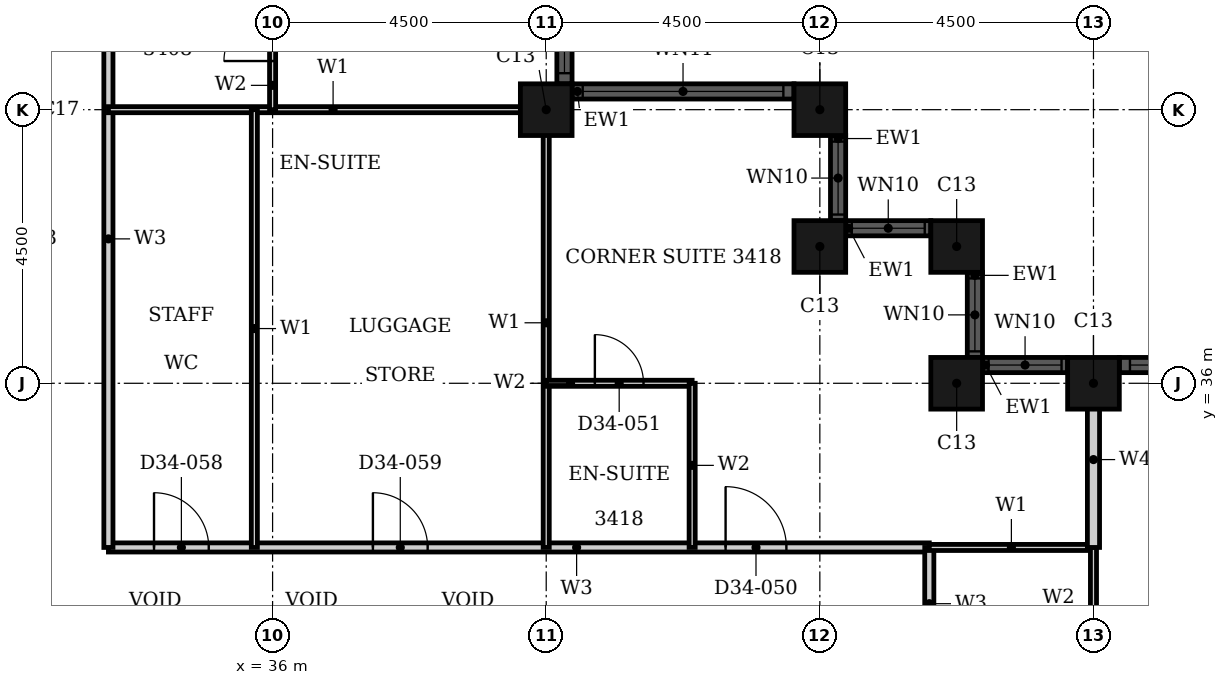
"""IFC4 building model, lengths in metres.
Left out: names, types, materials, properties, quantities, classifications, styles, units other than length and angle.
Written with IfcOpenShell. Run it as: python <this file> out.ifc"""

import sys

from ifc_helpers import new_model, si_unit, direction, frame, frame_2d, origin, origin_2d, place, context, subcontext, project, spatial, rectangle, hollow_rectangle, extrude, element, fill, save


model = new_model("IFC4")
c1 = context("Model", 3, precision=1e-05, world=origin(), true_north=direction((0.0, 1.0)))
c2 = subcontext(c1, "Body", "Model", "MODEL_VIEW")
j1 = project(units=[si_unit("LENGTHUNIT", "METRE"), si_unit("PLANEANGLEUNIT", "RADIAN")], contexts=[c1])
p1 = place(None, origin())
s1 = spatial("IfcSite", under=j1, at=p1, CompositionType="ELEMENT")
p2 = place(p1, origin())
s2 = spatial("IfcBuilding", under=s1, at=p2, CompositionType="ELEMENT")
p3 = place(p2, frame((0.0, 0.0, 136.8)))
s3 = spatial("IfcBuildingStorey", under=s2, at=p3, CompositionType="ELEMENT", Elevation=136.8)
for number, where, z_axis, x_axis in (
    (1, (49.5, 36.0, 0.0), (0.0, 0.0, 1.0), (1.0, 0.0, 0.0)),
    (2, (47.25, 36.0, 0.0), (0.0, 0.0, 1.0), (1.0, 0.0, 0.0)),
    (3, (47.25, 38.25, 0.0), (0.0, 0.0, 1.0), (1.0, 0.0, 0.0)),
    (4, (45.0, 38.25, 0.0), (0.0, 0.0, 1.0), (1.0, 0.0, 0.0)),
    (5, (45.0, 40.5, 0.0), (0.0, 0.0, 1.0), (1.0, 0.0, 0.0)),
):
    element("IfcColumn", number, at=place(p3, frame(where, z_axis=z_axis, x_axis=x_axis)), inside=s3, PredefinedType="COLUMN", context=c2, shape_type="SweptSolid", body=[
        extrude(hollow_rectangle(XDim=0.85, YDim=0.85, WallThickness=0.026, at=origin_2d()), origin(), (0.0, 0.0, 1.0), 3.6),
    ])
p4 = place(p3, frame((40.5, 40.5, 0.0), z_axis=(0.0, 0.0, 1.0), x_axis=(1.0, 0.0, 0.0)))
e6 = element("IfcColumn", 6, at=p4, inside=s3, PredefinedType="COLUMN", context=c2, shape_type="SweptSolid", body=[
    extrude(hollow_rectangle(XDim=0.85, YDim=0.85, WallThickness=0.026, at=origin_2d()), origin(), (0.0, 0.0, 1.0), 3.2),
])
p5 = place(p3, frame((58.075, 36.3, 0.0), z_axis=(0.0, 0.0, 1.0), x_axis=(-1.0, 0.0, 0.0)))
e7 = element("IfcWall", 7, at=p5, inside=s3, PredefinedType="SOLIDWALL", context=c2, shape_type="SweptSolid", body=[
    extrude(rectangle(XDim=8.15, YDim=0.25, at=frame_2d((4.075, 0.0))), origin(), (0.0, 0.0, 1.0), 3.6),
])
p6 = place(p5, frame((0.175, 0.0, 0.9)))
e8 = element("IfcOpeningElement", 8, at=p6, cuts=e7, PredefinedType="OPENING", context=c2, shape_type="SweptSolid", body=[
    extrude(rectangle(XDim=3.3, YDim=1.85, at=frame_2d((1.65, 0.925))), frame((0.0, 0.135, 0.0), z_axis=(0.0, -1.0, 0.0), x_axis=(1.0, 0.0, 0.0)), (0.0, 0.0, 1.0), 0.27),
])
p7 = place(p5, frame((4.675, 0.0, 0.9)))
e9 = element("IfcOpeningElement", 9, at=p7, cuts=e7, PredefinedType="OPENING", context=c2, shape_type="SweptSolid", body=[
    extrude(rectangle(XDim=3.3, YDim=1.85, at=frame_2d((1.65, 0.925))), frame((0.0, 0.135, 0.0), z_axis=(0.0, -1.0, 0.0), x_axis=(1.0, 0.0, 0.0)), (0.0, 0.0, 1.0), 0.27),
])
p8 = place(p3, frame((49.075, 36.3, 0.0), z_axis=(0.0, 0.0, 1.0), x_axis=(-1.0, 0.0, 0.0)))
e10 = element("IfcWall", 10, at=p8, inside=s3, PredefinedType="SOLIDWALL", context=c2, shape_type="SweptSolid", body=[
    extrude(rectangle(XDim=1.4, YDim=0.25, at=frame_2d((0.7, 0.0))), origin(), (0.0, 0.0, 1.0), 3.6),
])
p9 = place(p8, frame((0.1, 0.0, 0.9)))
e11 = element("IfcOpeningElement", 11, at=p9, cuts=e10, PredefinedType="OPENING", context=c2, shape_type="SweptSolid", body=[
    extrude(rectangle(XDim=1.2, YDim=1.85, at=frame_2d((0.6, 0.925))), frame((0.0, 0.135, 0.0), z_axis=(0.0, -1.0, 0.0), x_axis=(1.0, 0.0, 0.0)), (0.0, 0.0, 1.0), 0.27),
])
p10 = place(p3, frame((47.55, 36.425, 0.0), z_axis=(0.0, 0.0, 1.0), x_axis=(0.0, 1.0, 0.0)))
e12 = element("IfcWall", 12, at=p10, inside=s3, PredefinedType="SOLIDWALL", context=c2, shape_type="SweptSolid", body=[
    extrude(rectangle(XDim=1.4, YDim=0.25, at=frame_2d((0.7, 0.0))), origin(), (0.0, 0.0, 1.0), 3.6),
])
p11 = place(p10, frame((0.1, 0.0, 0.9)))
e13 = element("IfcOpeningElement", 13, at=p11, cuts=e12, PredefinedType="OPENING", context=c2, shape_type="SweptSolid", body=[
    extrude(rectangle(XDim=1.2, YDim=1.85, at=frame_2d((0.6, 0.925))), frame((0.0, 0.135, 0.0), z_axis=(0.0, -1.0, 0.0), x_axis=(1.0, 0.0, 0.0)), (0.0, 0.0, 1.0), 0.27),
])
p12 = place(p3, frame((46.825, 38.55, 0.0), z_axis=(0.0, 0.0, 1.0), x_axis=(-1.0, 0.0, 0.0)))
e14 = element("IfcWall", 14, at=p12, inside=s3, PredefinedType="SOLIDWALL", context=c2, shape_type="SweptSolid", body=[
    extrude(rectangle(XDim=1.4, YDim=0.25, at=frame_2d((0.7, 0.0))), origin(), (0.0, 0.0, 1.0), 3.6),
])
p13 = place(p12, frame((0.1, 0.0, 0.9)))
e15 = element("IfcOpeningElement", 15, at=p13, cuts=e14, PredefinedType="OPENING", context=c2, shape_type="SweptSolid", body=[
    extrude(rectangle(XDim=1.2, YDim=1.85, at=frame_2d((0.6, 0.925))), frame((0.0, 0.135, 0.0), z_axis=(0.0, -1.0, 0.0), x_axis=(1.0, 0.0, 0.0)), (0.0, 0.0, 1.0), 0.27),
])
p14 = place(p3, frame((45.3, 38.675, 0.0), z_axis=(0.0, 0.0, 1.0), x_axis=(0.0, 1.0, 0.0)))
e16 = element("IfcWall", 16, at=p14, inside=s3, PredefinedType="SOLIDWALL", context=c2, shape_type="SweptSolid", body=[
    extrude(rectangle(XDim=1.4, YDim=0.25, at=frame_2d((0.7, 0.0))), origin(), (0.0, 0.0, 1.0), 3.6),
])
p15 = place(p14, frame((0.1, 0.0, 0.9)))
e17 = element("IfcOpeningElement", 17, at=p15, cuts=e16, PredefinedType="OPENING", context=c2, shape_type="SweptSolid", body=[
    extrude(rectangle(XDim=1.2, YDim=1.85, at=frame_2d((0.6, 0.925))), frame((0.0, 0.135, 0.0), z_axis=(0.0, -1.0, 0.0), x_axis=(1.0, 0.0, 0.0)), (0.0, 0.0, 1.0), 0.27),
])
p16 = place(p3, frame((44.575, 40.8, 0.0), z_axis=(0.0, 0.0, 1.0), x_axis=(-1.0, 0.0, 0.0)))
e18 = element("IfcWall", 18, at=p16, inside=s3, PredefinedType="SOLIDWALL", context=c2, shape_type="SweptSolid", body=[
    extrude(rectangle(XDim=3.65, YDim=0.25, at=frame_2d((1.825, 0.0))), origin(), (0.0, 0.0, 1.0), 3.6),
])
p17 = place(p16, frame((0.175, 0.0, 0.9)))
e19 = element("IfcOpeningElement", 19, at=p17, cuts=e18, PredefinedType="OPENING", context=c2, shape_type="SweptSolid", body=[
    extrude(rectangle(XDim=3.3, YDim=1.35, at=frame_2d((1.65, 0.675))), frame((0.0, 0.135, 0.0), z_axis=(0.0, -1.0, 0.0), x_axis=(1.0, 0.0, 0.0)), (0.0, 0.0, 1.0), 0.27),
])
p18 = place(p3, frame((40.8, 40.925, 0.0), z_axis=(0.0, 0.0, 1.0), x_axis=(0.0, 1.0, 0.0)))
e20 = element("IfcWall", 20, at=p18, inside=s3, PredefinedType="SOLIDWALL", context=c2, shape_type="SweptSolid", body=[
    extrude(rectangle(XDim=8.15, YDim=0.25, at=frame_2d((4.075, 0.0))), origin(), (0.0, 0.0, 1.0), 3.6),
])
p19 = place(p18, frame((0.175, 0.0, 0.9)))
e21 = element("IfcOpeningElement", 21, at=p19, cuts=e20, PredefinedType="OPENING", context=c2, shape_type="SweptSolid", body=[
    extrude(rectangle(XDim=3.3, YDim=2.08, at=frame_2d((1.65, 1.04))), frame((0.0, 0.135, 0.0), z_axis=(0.0, -1.0, 0.0), x_axis=(1.0, 0.0, 0.0)), (0.0, 0.0, 1.0), 0.27),
])
p20 = place(p18, frame((4.675, 0.0, 0.9)))
e22 = element("IfcOpeningElement", 22, at=p20, cuts=e20, PredefinedType="OPENING", context=c2, shape_type="SweptSolid", body=[
    extrude(rectangle(XDim=3.3, YDim=2.08, at=frame_2d((1.65, 1.04))), frame((0.0, 0.135, 0.0), z_axis=(0.0, -1.0, 0.0), x_axis=(1.0, 0.0, 0.0)), (0.0, 0.0, 1.0), 0.27),
])
p21 = place(p3, frame((33.3, 33.3, 0.0), z_axis=(0.0, 0.0, 1.0), x_axis=(1.0, 0.0, 0.0)))
e23 = element("IfcWall", 23, at=p21, inside=s3, PredefinedType="PARTITIONING", context=c2, shape_type="SweptSolid", body=[
    extrude(rectangle(XDim=13.5, YDim=0.15, at=frame_2d((6.75, 0.0))), origin(), (0.0, 0.0, 1.0), 3.2),
])
p22 = place(p21, frame((10.15, 0.0, 0.0)))
e24 = element("IfcOpeningElement", 24, at=p22, cuts=e23, PredefinedType="OPENING", context=c2, shape_type="SweptSolid", body=[
    extrude(rectangle(XDim=1.0, YDim=2.1, at=frame_2d((0.5, 1.05))), frame((0.0, 0.085, 0.0), z_axis=(0.0, -1.0, 0.0), x_axis=(1.0, 0.0, 0.0)), (0.0, 0.0, 1.0), 0.17),
])
p23 = place(p21, frame((0.75, 0.0, 0.0)))
e25 = element("IfcOpeningElement", 25, at=p23, cuts=e23, PredefinedType="OPENING", context=c2, shape_type="SweptSolid", body=[
    extrude(rectangle(XDim=0.9, YDim=2.1, at=frame_2d((0.45, 1.05))), frame((0.0, 0.085, 0.0), z_axis=(0.0, -1.0, 0.0), x_axis=(1.0, 0.0, 0.0)), (0.0, 0.0, 1.0), 0.17),
])
p24 = place(p21, frame((4.35, 0.0, 0.0)))
e26 = element("IfcOpeningElement", 26, at=p24, cuts=e23, PredefinedType="OPENING", context=c2, shape_type="SweptSolid", body=[
    extrude(rectangle(XDim=0.9, YDim=2.1, at=frame_2d((0.45, 1.05))), frame((0.0, 0.085, 0.0), z_axis=(0.0, -1.0, 0.0), x_axis=(1.0, 0.0, 0.0)), (0.0, 0.0, 1.0), 0.17),
])
p25 = place(p3, frame((33.3, 33.3, 0.0), z_axis=(0.0, 0.0, 1.0), x_axis=(0.0, 1.0, 0.0)))
e27 = element("IfcWall", 27, at=p25, inside=s3, PredefinedType="PARTITIONING", context=c2, shape_type="SweptSolid", body=[
    extrude(rectangle(XDim=16.2, YDim=0.15, at=frame_2d((8.1, 0.0))), origin(), (0.0, 0.0, 1.0), 3.2),
])
p26 = place(p25, frame((10.15, 0.0, 0.0)))
e28 = element("IfcOpeningElement", 28, at=p26, cuts=e27, PredefinedType="OPENING", context=c2, shape_type="SweptSolid", body=[
    extrude(rectangle(XDim=1.0, YDim=2.1, at=frame_2d((0.5, 1.05))), frame((0.0, 0.085, 0.0), z_axis=(0.0, -1.0, 0.0), x_axis=(1.0, 0.0, 0.0)), (0.0, 0.0, 1.0), 0.17),
])
p27 = place(p25, frame((14.65, 0.0, 0.0)))
e29 = element("IfcOpeningElement", 29, at=p27, cuts=e27, PredefinedType="OPENING", context=c2, shape_type="SweptSolid", body=[
    extrude(rectangle(XDim=1.0, YDim=2.1, at=frame_2d((0.5, 1.05))), frame((0.0, 0.085, 0.0), z_axis=(0.0, -1.0, 0.0), x_axis=(1.0, 0.0, 0.0)), (0.0, 0.0, 1.0), 0.17),
])
p28 = place(p3, frame((46.8, 28.8, 0.0), z_axis=(0.0, 0.0, 1.0), x_axis=(0.0, 1.0, 0.0)))
e30 = element("IfcWall", 30, at=p28, inside=s3, PredefinedType="PARTITIONING", context=c2, shape_type="SweptSolid", body=[
    extrude(rectangle(XDim=4.5, YDim=0.15, at=frame_2d((2.25, 0.0))), origin(), (0.0, 0.0, 1.0), 3.2),
])
p29 = place(p28, frame((1.75, 0.0, 0.0)))
e31 = element("IfcOpeningElement", 31, at=p29, cuts=e30, PredefinedType="OPENING", context=c2, shape_type="SweptSolid", body=[
    extrude(rectangle(XDim=0.9, YDim=2.1, at=frame_2d((0.45, 1.05))), frame((0.0, 0.085, 0.0), z_axis=(0.0, -1.0, 0.0), x_axis=(1.0, 0.0, 0.0)), (0.0, 0.0, 1.0), 0.17),
])
p30 = place(p3, frame((46.8, 33.3, 0.0), z_axis=(0.0, 0.0, 1.0), x_axis=(1.0, 0.0, 0.0)))
e32 = element("IfcWall", 32, at=p30, inside=s3, PredefinedType="PARTITIONING", context=c2, shape_type="SweptSolid", body=[
    extrude(rectangle(XDim=2.7, YDim=0.1, at=frame_2d((1.35, 0.0))), origin(), (0.0, 0.0, 1.0), 3.2),
])
p31 = place(p3, frame((33.3, 40.5, 0.0), z_axis=(0.0, 0.0, 1.0), x_axis=(1.0, 0.0, 0.0)))
e33 = element("IfcWall", 33, at=p31, inside=s3, PredefinedType="PARTITIONING", context=c2, shape_type="SweptSolid", body=[
    extrude(rectangle(XDim=7.39, YDim=0.1, at=frame_2d((3.695, 0.0))), origin(), (0.0, 0.0, 1.0), 2.268),
])
p32 = place(p3, frame((35.7, 33.3, 0.0), z_axis=(0.0, 0.0, 1.0), x_axis=(0.0, 1.0, 0.0)))
e34 = element("IfcWall", 34, at=p32, inside=s3, PredefinedType="PARTITIONING", context=c2, shape_type="SweptSolid", body=[
    extrude(rectangle(XDim=7.2, YDim=0.1, at=frame_2d((3.6, 0.0))), origin(), (0.0, 0.0, 1.0), 3.2),
])
p33 = place(p3, frame((40.5, 33.3, 0.0), z_axis=(0.0, 0.0, 1.0), x_axis=(0.0, 1.0, 0.0)))
e35 = element("IfcWall", 35, at=p33, inside=s3, PredefinedType="PARTITIONING", context=c2, shape_type="SweptSolid", body=[
    extrude(rectangle(XDim=7.39, YDim=0.1, at=frame_2d((3.695, 0.0))), origin(), (0.0, 0.0, 1.0), 3.2),
])
p34 = place(p3, frame((49.5, 28.8, 0.0), z_axis=(0.0, 0.0, 1.0), x_axis=(0.0, 1.0, 0.0)))
e36 = element("IfcWall", 36, at=p34, inside=s3, PredefinedType="PARTITIONING", context=c2, shape_type="SweptSolid", body=[
    extrude(rectangle(XDim=4.5, YDim=0.1, at=frame_2d((2.25, 0.0))), origin(), (0.0, 0.0, 1.0), 2.28),
])
p35 = place(p3, frame((49.5, 33.3, 0.0), z_axis=(0.0, 0.0, 1.0), x_axis=(0.0, 1.0, 0.0)))
e37 = element("IfcWall", 37, at=p35, inside=s3, PredefinedType="PARTITIONING", context=c2, shape_type="SweptSolid", body=[
    extrude(rectangle(XDim=2.89, YDim=0.2, at=frame_2d((1.445, 0.0))), origin(), (0.0, 0.0, 1.0), 2.28),
])
p36 = place(p3, frame((40.5, 36.0, 0.0), z_axis=(0.0, 0.0, 1.0), x_axis=(1.0, 0.0, 0.0)))
e38 = element("IfcWall", 38, at=p36, inside=s3, PredefinedType="PARTITIONING", context=c2, shape_type="SweptSolid", body=[
    extrude(rectangle(XDim=2.4, YDim=0.1, at=frame_2d((1.2, 0.0))), origin(), (0.0, 0.0, 1.0), 3.2),
])
p37 = place(p36, frame((0.8, 0.0, 0.0)))
e39 = element("IfcOpeningElement", 39, at=p37, cuts=e38, PredefinedType="OPENING", context=c2, shape_type="SweptSolid", body=[
    extrude(rectangle(XDim=0.8, YDim=2.1, at=frame_2d((0.4, 1.05))), frame((0.0, 0.06, 0.0), z_axis=(0.0, -1.0, 0.0), x_axis=(1.0, 0.0, 0.0)), (0.0, 0.0, 1.0), 0.12),
])
p38 = place(p3, frame((36.0, 40.5, 0.0), z_axis=(0.0, 0.0, 1.0), x_axis=(0.0, 1.0, 0.0)))
e40 = element("IfcWall", 40, at=p38, inside=s3, PredefinedType="PARTITIONING", context=c2, shape_type="SweptSolid", body=[
    extrude(rectangle(XDim=2.4, YDim=0.1, at=frame_2d((1.2, 0.0))), origin(), (0.0, 0.0, 1.0), 2.48),
])
p39 = place(p38, frame((0.8, 0.0, 0.0)))
e41 = element("IfcOpeningElement", 41, at=p39, cuts=e40, PredefinedType="OPENING", context=c2, shape_type="SweptSolid", body=[
    extrude(rectangle(XDim=0.8, YDim=2.1, at=frame_2d((0.4, 1.05))), frame((0.0, 0.06, 0.0), z_axis=(0.0, -1.0, 0.0), x_axis=(1.0, 0.0, 0.0)), (0.0, 0.0, 1.0), 0.12),
])
p40 = place(p3, frame((42.9, 33.3, 0.0), z_axis=(0.0, 0.0, 1.0), x_axis=(0.0, 1.0, 0.0)))
e42 = element("IfcWall", 42, at=p40, inside=s3, PredefinedType="PARTITIONING", context=c2, shape_type="SweptSolid", body=[
    extrude(rectangle(XDim=2.7, YDim=0.1, at=frame_2d((1.35, 0.0))), origin(), (0.0, 0.0, 1.0), 3.2),
])
p41 = place(p7, origin())
e43 = element("IfcWindow", 43, at=p41, inside=s3, PartitioningType="SINGLE_PANEL", PredefinedType="WINDOW", context=c2, shape_type="SweptSolid", body=[
    extrude(rectangle(XDim=3.3, YDim=1.85, at=frame_2d((1.65, 0.925))), frame((0.0, 0.03, 0.0), z_axis=(0.0, -1.0, 0.0), x_axis=(1.0, 0.0, 0.0)), (0.0, 0.0, 1.0), 0.06),
])
fill(e9, e43)
p42 = place(p9, origin())
e44 = element("IfcWindow", 44, at=p42, inside=s3, PartitioningType="SINGLE_PANEL", PredefinedType="WINDOW", context=c2, shape_type="SweptSolid", body=[
    extrude(rectangle(XDim=1.2, YDim=1.85, at=frame_2d((0.6, 0.925))), frame((0.0, 0.03, 0.0), z_axis=(0.0, -1.0, 0.0), x_axis=(1.0, 0.0, 0.0)), (0.0, 0.0, 1.0), 0.06),
])
fill(e11, e44)
p43 = place(p11, origin())
e45 = element("IfcWindow", 45, at=p43, inside=s3, PartitioningType="SINGLE_PANEL", PredefinedType="WINDOW", context=c2, shape_type="SweptSolid", body=[
    extrude(rectangle(XDim=1.2, YDim=1.85, at=frame_2d((0.6, 0.925))), frame((0.0, 0.03, 0.0), z_axis=(0.0, -1.0, 0.0), x_axis=(1.0, 0.0, 0.0)), (0.0, 0.0, 1.0), 0.06),
])
fill(e13, e45)
p44 = place(p13, origin())
e46 = element("IfcWindow", 46, at=p44, inside=s3, PartitioningType="SINGLE_PANEL", PredefinedType="WINDOW", context=c2, shape_type="SweptSolid", body=[
    extrude(rectangle(XDim=1.2, YDim=1.85, at=frame_2d((0.6, 0.925))), frame((0.0, 0.03, 0.0), z_axis=(0.0, -1.0, 0.0), x_axis=(1.0, 0.0, 0.0)), (0.0, 0.0, 1.0), 0.06),
])
fill(e15, e46)
p45 = place(p15, origin())
e47 = element("IfcWindow", 47, at=p45, inside=s3, PartitioningType="SINGLE_PANEL", PredefinedType="WINDOW", context=c2, shape_type="SweptSolid", body=[
    extrude(rectangle(XDim=1.2, YDim=1.85, at=frame_2d((0.6, 0.925))), frame((0.0, 0.03, 0.0), z_axis=(0.0, -1.0, 0.0), x_axis=(1.0, 0.0, 0.0)), (0.0, 0.0, 1.0), 0.06),
])
fill(e17, e47)
p46 = place(p17, origin())
e48 = element("IfcWindow", 48, at=p46, inside=s3, PartitioningType="SINGLE_PANEL", PredefinedType="WINDOW", context=c2, shape_type="SweptSolid", body=[
    extrude(rectangle(XDim=3.3, YDim=1.35, at=frame_2d((1.65, 0.675))), frame((0.0, 0.03, 0.0), z_axis=(0.0, -1.0, 0.0), x_axis=(1.0, 0.0, 0.0)), (0.0, 0.0, 1.0), 0.06),
])
fill(e19, e48)
p47 = place(p19, origin())
e49 = element("IfcWindow", 49, at=p47, inside=s3, PartitioningType="SINGLE_PANEL", PredefinedType="WINDOW", context=c2, shape_type="SweptSolid", body=[
    extrude(rectangle(XDim=3.3, YDim=2.08, at=frame_2d((1.65, 1.04))), frame((0.0, 0.03, 0.0), z_axis=(0.0, -1.0, 0.0), x_axis=(1.0, 0.0, 0.0)), (0.0, 0.0, 1.0), 0.06),
])
fill(e21, e49)
p48 = place(p39, origin())
e50 = element("IfcDoor", 50, at=p48, inside=s3, OperationType="SINGLE_SWING_RIGHT", PredefinedType="DOOR", context=c2, shape_type="SweptSolid", body=[
    extrude(rectangle(XDim=0.8, YDim=2.1, at=frame_2d((0.4, 1.05))), frame((0.0, 0.025, 0.0), z_axis=(0.0, -1.0, 0.0), x_axis=(1.0, 0.0, 0.0)), (0.0, 0.0, 1.0), 0.05),
])
fill(e41, e50)
p49 = place(p22, origin())
e51 = element("IfcDoor", 51, at=p49, inside=s3, OperationType="SINGLE_SWING_RIGHT", PredefinedType="DOOR", context=c2, shape_type="SweptSolid", body=[
    extrude(rectangle(XDim=1.0, YDim=2.1, at=frame_2d((0.5, 1.05))), frame((0.0, 0.025, 0.0), z_axis=(0.0, -1.0, 0.0), x_axis=(1.0, 0.0, 0.0)), (0.0, 0.0, 1.0), 0.05),
])
fill(e24, e51)
p50 = place(p37, origin())
e52 = element("IfcDoor", 52, at=p50, inside=s3, OperationType="SINGLE_SWING_RIGHT", PredefinedType="DOOR", context=c2, shape_type="SweptSolid", body=[
    extrude(rectangle(XDim=0.8, YDim=2.1, at=frame_2d((0.4, 1.05))), frame((0.0, 0.025, 0.0), z_axis=(0.0, -1.0, 0.0), x_axis=(1.0, 0.0, 0.0)), (0.0, 0.0, 1.0), 0.05),
])
fill(e39, e52)
p51 = place(p23, origin())
e53 = element("IfcDoor", 53, at=p51, inside=s3, OperationType="SINGLE_SWING_LEFT", PredefinedType="DOOR", context=c2, shape_type="SweptSolid", body=[
    extrude(rectangle(XDim=0.9, YDim=2.1, at=frame_2d((0.45, 1.05))), frame((0.0, 0.025, 0.0), z_axis=(0.0, -1.0, 0.0), x_axis=(1.0, 0.0, 0.0)), (0.0, 0.0, 1.0), 0.05),
])
fill(e25, e53)
p52 = place(p24, origin())
e54 = element("IfcDoor", 54, at=p52, inside=s3, OperationType="SINGLE_SWING_RIGHT", PredefinedType="DOOR", context=c2, shape_type="SweptSolid", body=[
    extrude(rectangle(XDim=0.9, YDim=2.1, at=frame_2d((0.45, 1.05))), frame((0.0, 0.025, 0.0), z_axis=(0.0, -1.0, 0.0), x_axis=(1.0, 0.0, 0.0)), (0.0, 0.0, 1.0), 0.05),
])
fill(e26, e54)
save(model, sys.argv[1])
